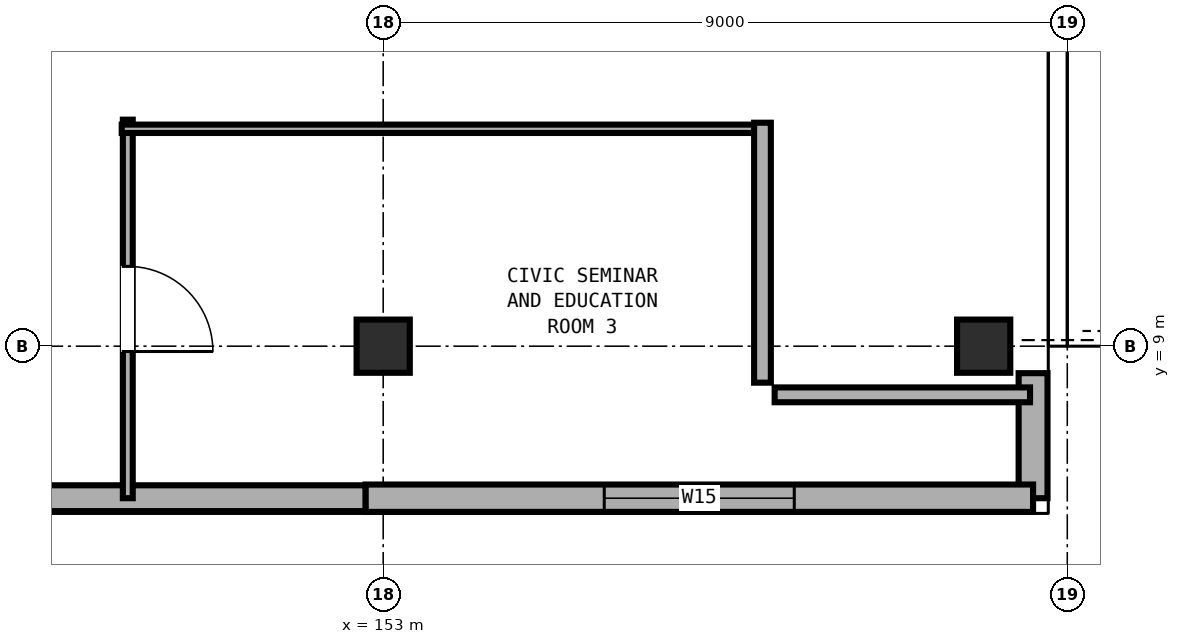
"""IFC4 building model, lengths in metres.
Left out: names, types, materials, properties, quantities, classifications, styles, units other than length and angle.
Written with IfcOpenShell. Run it as: python <this file> out.ifc"""

import sys

from ifc_helpers import new_model, si_unit, direction, frame, frame_2d, origin, origin_2d, place, context, subcontext, project, spatial, rectangle, extrude, element, fill, save


model = new_model("IFC4")
c1 = context("Model", 3, precision=1e-05, world=origin(), true_north=direction((0.0, 1.0)))
c2 = subcontext(c1, "Body", "Model", "MODEL_VIEW")
j1 = project(units=[si_unit("LENGTHUNIT", "METRE"), si_unit("PLANEANGLEUNIT", "RADIAN")], contexts=[c1])
p1 = place(None, origin())
s1 = spatial("IfcSite", under=j1, at=p1, CompositionType="ELEMENT")
p2 = place(p1, origin())
s2 = spatial("IfcBuilding", under=s1, at=p2, CompositionType="ELEMENT")
p3 = place(p2, frame((0.0, 0.0, 9.6)))
s3 = spatial("IfcBuildingStorey", under=s2, at=p3, CompositionType="ELEMENT", Elevation=9.6)
for number, where, z_axis, x_axis in (
    (1, (153.0, 9.0, 0.0), (0.0, 0.0, 1.0), (1.0, 0.0, 0.0)),
    (2, (160.9, 9.0, 0.0), (0.0, 0.0, 1.0), (1.0, 0.0, 0.0)),
):
    element("IfcColumn", number, at=place(p3, frame(where, z_axis=z_axis, x_axis=x_axis)), inside=s3, PredefinedType="COLUMN", context=c2, shape_type="SweptSolid", body=[
        extrude(rectangle(XDim=0.7, YDim=0.7, at=origin_2d()), origin(), (0.0, 0.0, 1.0), 4.8),
    ])
p4 = place(p3, frame((161.55, 8.645, 0.0), z_axis=(0.0, 0.0, 1.0), x_axis=(0.0, -1.0, 0.0)))
e3 = element("IfcWall", 3, at=p4, inside=s3, PredefinedType="SOLIDWALL", context=c2, shape_type="SweptSolid", body=[
    extrude(rectangle(XDim=1.645, YDim=0.38, at=frame_2d((0.823, 0.0))), origin(), (0.0, 0.0, 1.0), 3.58),
])
p5 = place(p3, frame((161.55, 7.0, 0.0), z_axis=(0.0, 0.0, 1.0), x_axis=(-1.0, 0.0, 0.0)))
e4 = element("IfcWall", 4, at=p5, inside=s3, PredefinedType="SOLIDWALL", context=c2, shape_type="SweptSolid", body=[
    extrude(rectangle(XDim=8.783, YDim=0.36, at=frame_2d((4.392, 0.0))), origin(), (0.0, 0.0, 1.0), 3.58),
])
p6 = place(p5, frame((3.142, 0.0, 0.9)))
e5 = element("IfcOpeningElement", 5, at=p6, cuts=e4, PredefinedType="OPENING", context=c2, shape_type="SweptSolid", body=[
    extrude(rectangle(XDim=2.5, YDim=2.1, at=frame_2d((1.25, 1.05))), frame((0.0, 0.19, 0.0), z_axis=(0.0, -1.0, 0.0), x_axis=(1.0, 0.0, 0.0)), (0.0, 0.0, 1.0), 0.38),
])
p7 = place(p3, frame((152.767, 7.0, 0.0), z_axis=(0.0, 0.0, 1.0), x_axis=(-1.0, 0.0, 0.0)))
e6 = element("IfcWall", 6, at=p7, inside=s3, PredefinedType="SOLIDWALL", context=c2, shape_type="SweptSolid", body=[
    extrude(rectangle(XDim=8.783, YDim=0.34, at=frame_2d((4.392, 0.0))), origin(), (0.0, 0.0, 1.0), 3.58),
])
p8 = place(p7, frame((4.57, 0.0, 0.9)))
e7 = element("IfcOpeningElement", 7, at=p8, cuts=e6, PredefinedType="OPENING", context=c2, shape_type="SweptSolid", body=[
    extrude(rectangle(XDim=2.6, YDim=2.15, at=frame_2d((1.3, 1.075))), frame((0.0, 0.18, 0.0), z_axis=(0.0, -1.0, 0.0), x_axis=(1.0, 0.0, 0.0)), (0.0, 0.0, 1.0), 0.36),
])
p9 = place(p3, frame((149.64, 11.98, 0.0), z_axis=(0.0, 0.0, 1.0), x_axis=(0.0, -1.0, 0.0)))
e8 = element("IfcWall", 8, at=p9, inside=s3, PredefinedType="PARTITIONING", context=c2, shape_type="SweptSolid", body=[
    extrude(rectangle(XDim=4.98, YDim=0.13, at=frame_2d((2.49, 0.0))), origin(), (0.0, 0.0, 1.0), 3.56),
])
p10 = place(p9, frame((1.93, 0.0, 0.0)))
e9 = element("IfcOpeningElement", 9, at=p10, cuts=e8, PredefinedType="OPENING", context=c2, shape_type="SweptSolid", body=[
    extrude(rectangle(XDim=1.12, YDim=2.22, at=frame_2d((0.56, 1.11))), frame((0.0, 0.075, 0.0), z_axis=(0.0, -1.0, 0.0), x_axis=(1.0, 0.0, 0.0)), (0.0, 0.0, 1.0), 0.15),
])
p11 = place(p3, frame((149.56, 11.86, 0.0), z_axis=(0.0, 0.0, 1.0), x_axis=(1.0, 0.0, 0.0)))
e10 = element("IfcWall", 10, at=p11, inside=s3, PredefinedType="PARTITIONING", context=c2, shape_type="SweptSolid", body=[
    extrude(rectangle(XDim=8.51, YDim=0.11, at=frame_2d((4.255, 0.0))), origin(), (0.0, 0.0, 1.0), 3.56),
])
p12 = place(p3, frame((157.99, 11.94, 0.0), z_axis=(0.0, 0.0, 1.0), x_axis=(0.0, -1.0, 0.0)))
e11 = element("IfcWall", 11, at=p12, inside=s3, PredefinedType="PARTITIONING", context=c2, shape_type="SweptSolid", body=[
    extrude(rectangle(XDim=3.42, YDim=0.22, at=frame_2d((1.71, 0.0))), origin(), (0.0, 0.0, 1.0), 3.56),
])
p13 = place(p3, frame((158.15, 8.36, 0.0), z_axis=(0.0, 0.0, 1.0), x_axis=(1.0, 0.0, 0.0)))
e12 = element("IfcWall", 12, at=p13, inside=s3, PredefinedType="PARTITIONING", context=c2, shape_type="SweptSolid", body=[
    extrude(rectangle(XDim=3.36, YDim=0.195, at=frame_2d((1.68, 0.0))), origin(), (0.0, 0.0, 1.0), 3.56),
])
p14 = place(p6, origin())
e13 = element("IfcWindow", 13, at=p14, inside=s3, PartitioningType="DOUBLE_PANEL_VERTICAL", PredefinedType="WINDOW", context=c2, shape_type="SweptSolid", body=[
    extrude(rectangle(XDim=2.5, YDim=2.1, at=frame_2d((1.25, 1.05))), frame((0.0, 0.03, 0.0), z_axis=(0.0, -1.0, 0.0), x_axis=(1.0, 0.0, 0.0)), (0.0, 0.0, 1.0), 0.06),
])
fill(e5, e13)
p15 = place(p10, origin())
e14 = element("IfcDoor", 14, at=p15, inside=s3, OperationType="SINGLE_SWING_RIGHT", PredefinedType="DOOR", context=c2, shape_type="SweptSolid", body=[
    extrude(rectangle(XDim=1.12, YDim=2.22, at=frame_2d((0.56, 1.11))), frame((0.0, 0.025, 0.0), z_axis=(0.0, -1.0, 0.0), x_axis=(1.0, 0.0, 0.0)), (0.0, 0.0, 1.0), 0.05),
])
fill(e9, e14)
save(model, sys.argv[1])
